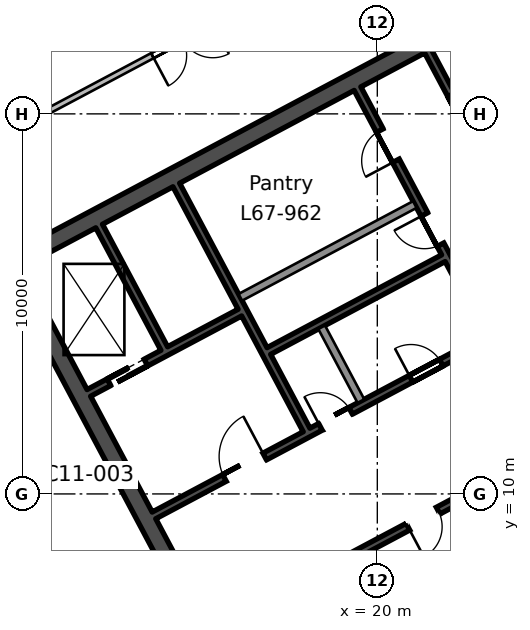
"""IFC4 building model, lengths in metres.
Left out: names, types, materials, properties, quantities, classifications, styles, units other than length and angle.
Written with IfcOpenShell. Run it as: python <this file> out.ifc"""

import sys

from ifc_helpers import new_model, si_unit, direction, frame, frame_2d, origin, place, context, subcontext, project, spatial, rectangle, extrude, element, fill, save


model = new_model("IFC4")
c1 = context("Model", 3, precision=1e-05, world=origin(), true_north=direction((0.0, 1.0)))
c2 = subcontext(c1, "Body", "Model", "MODEL_VIEW")
j1 = project(units=[si_unit("LENGTHUNIT", "METRE"), si_unit("PLANEANGLEUNIT", "RADIAN")], contexts=[c1])
p1 = place(None, origin())
s1 = spatial("IfcSite", under=j1, at=p1, CompositionType="ELEMENT")
p2 = place(p1, origin())
s2 = spatial("IfcBuilding", under=s1, at=p2, CompositionType="ELEMENT")
p3 = place(p2, frame((0.0, 0.0, 297.0)))
s3 = spatial("IfcBuildingStorey", under=s2, at=p3, CompositionType="ELEMENT", Elevation=297.0)
p4 = place(p3, frame((19.207, -0.604, 0.0), z_axis=(0.0, 0.0, 1.0), x_axis=(-0.469467968382, 0.882949504028, 0.0)))
e1 = element("IfcWall", 1, at=p4, inside=s3, PredefinedType="SHEAR", context=c2, shape_type="SweptSolid", body=[
    extrude(rectangle(XDim=19.1, YDim=0.45, at=frame_2d((9.55, 0.0))), origin(), (0.0, 0.0, 1.0), 3.9),
])
p5 = place(p4, frame((6.55, 0.0, 0.0)))
e2 = element("IfcOpeningElement", 2, at=p5, cuts=e1, PredefinedType="OPENING", context=c2, shape_type="SweptSolid", body=[
    extrude(rectangle(XDim=2.4, YDim=2.4, at=frame_2d((1.2, 1.2))), frame((0.0, 0.235, 0.0), z_axis=(0.0, -1.0, 0.0), x_axis=(1.0, 0.0, 0.0)), (0.0, 0.0, 1.0), 0.47),
])
p6 = place(p3, frame((19.3, -0.299, 0.0), z_axis=(0.0, 0.0, 1.0), x_axis=(0.88295276571, 0.46946183394, 0.0)))
e3 = element("IfcWall", 3, at=p6, inside=s3, PredefinedType="SHEAR", context=c2, shape_type="SweptSolid", body=[
    extrude(rectangle(XDim=20.2, YDim=0.45, at=frame_2d((10.1, 0.0))), origin(), (0.0, 0.0, 1.0), 3.9),
])
p7 = place(p3, frame((10.544, 16.167, 0.0), z_axis=(0.0, 0.0, 1.0), x_axis=(0.882947755831, 0.46947125628, 0.0)))
e4 = element("IfcWall", 4, at=p7, inside=s3, PredefinedType="SHEAR", context=c2, shape_type="SweptSolid", body=[
    extrude(rectangle(XDim=20.2, YDim=0.45, at=frame_2d((10.1, 0.0))), origin(), (0.0, 0.0, 1.0), 3.9),
])
p8 = place(p3, frame((14.394, 13.826, 0.0), z_axis=(0.0, 0.0, 1.0), x_axis=(-0.469494272526, 0.882935517501, 0.0)))
e5 = element("IfcWall", 5, at=p8, inside=s3, PredefinedType="SHEAR", context=c2, shape_type="SweptSolid", body=[
    extrude(rectangle(XDim=3.65, YDim=0.2, at=frame_2d((1.825, 0.0))), origin(), (0.0, 0.0, 1.0), 3.9),
])
p9 = place(p3, frame((18.138, 11.683, 0.0), z_axis=(0.0, 0.0, 1.0), x_axis=(-0.469480409012, 0.88294288918, 0.0)))
e6 = element("IfcWall", 6, at=p9, inside=s3, PredefinedType="SHEAR", context=c2, shape_type="SweptSolid", body=[
    extrude(rectangle(XDim=7.3, YDim=0.2, at=frame_2d((3.65, 0.0))), origin(), (0.0, 0.0, 1.0), 3.9),
])
p10 = place(p3, frame((19.569, 12.444, 0.0), z_axis=(0.0, 0.0, 1.0), x_axis=(-0.4694473164, 0.882960484464, 0.0)))
e7 = element("IfcWall", 7, at=p10, inside=s3, PredefinedType="SOLIDWALL", context=c2, shape_type="SweptSolid", body=[
    extrude(rectangle(XDim=2.2, YDim=0.2, at=frame_2d((1.1, 0.0))), origin(), (0.0, 0.0, 1.0), 3.9),
])
p11 = place(p3, frame((22.906, 14.218, 0.0), z_axis=(0.0, 0.0, 1.0), x_axis=(-0.469480409012, 0.88294288918, 0.0)))
e8 = element("IfcWall", 8, at=p11, inside=s3, PredefinedType="SHEAR", context=c2, shape_type="SweptSolid", body=[
    extrude(rectangle(XDim=7.3, YDim=0.2, at=frame_2d((3.65, 0.0))), origin(), (0.0, 0.0, 1.0), 3.9),
])
p12 = place(p11, frame((2.65, 0.0, 0.0)))
e9 = element("IfcOpeningElement", 9, at=p12, cuts=e8, PredefinedType="OPENING", context=c2, shape_type="SweptSolid", body=[
    extrude(rectangle(XDim=0.9, YDim=2.1, at=frame_2d((0.45, 1.05))), frame((0.0, 0.11, 0.0), z_axis=(0.0, -1.0, 0.0), x_axis=(1.0, 0.0, 0.0)), (0.0, 0.0, 1.0), 0.22),
])
p13 = place(p11, frame((5.15, 0.0, 0.0)))
e10 = element("IfcOpeningElement", 10, at=p13, cuts=e8, PredefinedType="OPENING", context=c2, shape_type="SweptSolid", body=[
    extrude(rectangle(XDim=0.9, YDim=2.1, at=frame_2d((0.45, 1.05))), frame((0.0, 0.11, 0.0), z_axis=(0.0, -1.0, 0.0), x_axis=(1.0, 0.0, 0.0)), (0.0, 0.0, 1.0), 0.22),
])
p14 = place(p3, frame((24.76, 15.204, 0.0), z_axis=(0.0, 0.0, 1.0), x_axis=(-0.469494272526, 0.882935517501, 0.0)))
e11 = element("IfcWall", 11, at=p14, inside=s3, PredefinedType="SHEAR", context=c2, shape_type="SweptSolid", body=[
    extrude(rectangle(XDim=7.3, YDim=0.2, at=frame_2d((3.65, 0.0))), origin(), (0.0, 0.0, 1.0), 3.9),
])
p15 = place(p14, frame((4.8, 0.0, 0.0)))
e12 = element("IfcOpeningElement", 12, at=p15, cuts=e11, PredefinedType="OPENING", context=c2, shape_type="SweptSolid", body=[
    extrude(rectangle(XDim=1.2, YDim=2.1, at=frame_2d((0.6, 1.05))), frame((0.0, 0.11, 0.0), z_axis=(0.0, -1.0, 0.0), x_axis=(1.0, 0.0, 0.0)), (0.0, 0.0, 1.0), 0.22),
])
p16 = place(p3, frame((18.104, 7.701, 0.0), z_axis=(0.0, 0.0, 1.0), x_axis=(0.882952937579, 0.469461510692, 0.0)))
e13 = element("IfcWall", 13, at=p16, inside=s3, PredefinedType="SHEAR", context=c2, shape_type="SweptSolid", body=[
    extrude(rectangle(XDim=5.4, YDim=0.2, at=frame_2d((2.7, 0.0))), origin(), (0.0, 0.0, 1.0), 3.9),
])
p17 = place(p16, frame((0.36, 0.0, 0.0)))
e14 = element("IfcOpeningElement", 14, at=p17, cuts=e13, PredefinedType="OPENING", context=c2, shape_type="SweptSolid", body=[
    extrude(rectangle(XDim=0.9, YDim=2.1, at=frame_2d((0.45, 1.05))), frame((0.0, 0.11, 0.0), z_axis=(0.0, -1.0, 0.0), x_axis=(1.0, 0.0, 0.0)), (0.0, 0.0, 1.0), 0.22),
])
p18 = place(p16, frame((3.06, 0.0, 0.0)))
e15 = element("IfcOpeningElement", 15, at=p18, cuts=e13, PredefinedType="OPENING", context=c2, shape_type="SweptSolid", body=[
    extrude(rectangle(XDim=0.9, YDim=2.1, at=frame_2d((0.45, 1.05))), frame((0.0, 0.11, 0.0), z_axis=(0.0, -1.0, 0.0), x_axis=(1.0, 0.0, 0.0)), (0.0, 0.0, 1.0), 0.22),
])
p19 = place(p3, frame((14.124, 9.435, 0.0), z_axis=(0.0, 0.0, 1.0), x_axis=(0.882940221191, 0.469485426614, 0.0)))
e16 = element("IfcWall", 16, at=p19, inside=s3, PredefinedType="SHEAR", context=c2, shape_type="SweptSolid", body=[
    extrude(rectangle(XDim=10.0, YDim=0.2, at=frame_2d((5.0, 0.0))), origin(), (0.0, 0.0, 1.0), 3.9),
])
p20 = place(p19, frame((2.1, 0.0, 0.0)))
e17 = element("IfcOpeningElement", 17, at=p20, cuts=e16, PredefinedType="OPENING", context=c2, shape_type="SweptSolid", body=[
    extrude(rectangle(XDim=1.2, YDim=2.1, at=frame_2d((0.6, 1.05))), frame((0.0, 0.11, 0.0), z_axis=(0.0, -1.0, 0.0), x_axis=(1.0, 0.0, 0.0)), (0.0, 0.0, 1.0), 0.22),
])
p21 = place(p19, frame((4.96, 0.0, 0.0)))
e18 = element("IfcOpeningElement", 18, at=p21, cuts=e16, PredefinedType="OPENING", context=c2, shape_type="SweptSolid", body=[
    extrude(rectangle(XDim=0.9, YDim=2.1, at=frame_2d((0.45, 1.05))), frame((0.0, 0.11, 0.0), z_axis=(0.0, -1.0, 0.0), x_axis=(1.0, 0.0, 0.0)), (0.0, 0.0, 1.0), 0.22),
])
p22 = place(p19, frame((7.66, 0.0, 0.0)))
e19 = element("IfcOpeningElement", 19, at=p22, cuts=e16, PredefinedType="OPENING", context=c2, shape_type="SweptSolid", body=[
    extrude(rectangle(XDim=0.9, YDim=2.1, at=frame_2d((0.45, 1.05))), frame((0.0, 0.11, 0.0), z_axis=(0.0, -1.0, 0.0), x_axis=(1.0, 0.0, 0.0)), (0.0, 0.0, 1.0), 0.22),
])
p23 = place(p3, frame((17.147, 13.761, 0.0), z_axis=(0.0, 0.0, 1.0), x_axis=(0.882964314875, 0.469440111896, 0.0)))
e20 = element("IfcWall", 20, at=p23, inside=s3, PredefinedType="SHEAR", context=c2, shape_type="SweptSolid", body=[
    extrude(rectangle(XDim=5.2, YDim=0.2, at=frame_2d((2.6, 0.0))), origin(), (0.0, 0.0, 1.0), 3.9),
])
p24 = place(p3, frame((12.41, 12.658, 0.0), z_axis=(0.0, 0.0, 1.0), x_axis=(0.8829484765, 0.469469900894, 0.0)))
e21 = element("IfcWall", 21, at=p24, inside=s3, PredefinedType="SHEAR", context=c2, shape_type="SweptSolid", body=[
    extrude(rectangle(XDim=4.5, YDim=0.2, at=frame_2d((2.25, 0.0))), origin(), (0.0, 0.0, 1.0), 3.9),
])
p25 = place(p24, frame((0.6, 0.0, 0.0)))
e22 = element("IfcOpeningElement", 22, at=p25, cuts=e21, PredefinedType="OPENING", context=c2, shape_type="SweptSolid", body=[
    extrude(rectangle(XDim=1.1, YDim=2.1, at=frame_2d((0.55, 1.05))), frame((0.0, 0.11, 0.0), z_axis=(0.0, -1.0, 0.0), x_axis=(1.0, 0.0, 0.0)), (0.0, 0.0, 1.0), 0.22),
])
p26 = place(p3, frame((16.396, 15.173, 0.0), z_axis=(0.0, 0.0, 1.0), x_axis=(0.882934506056, 0.469496174655, 0.0)))
e23 = element("IfcWall", 23, at=p26, inside=s3, PredefinedType="SOLIDWALL", context=c2, shape_type="SweptSolid", body=[
    extrude(rectangle(XDim=5.2, YDim=0.2, at=frame_2d((2.6, 0.0))), origin(), (0.0, 0.0, 1.0), 3.9),
])
p27 = place(p3, frame((0.0, 14.044, 0.0), z_axis=(0.0, 0.0, 1.0), x_axis=(0.882952097871, 0.469463089992, 0.0)))
e24 = element("IfcWall", 24, at=p27, inside=s3, PredefinedType="PARTITIONING", context=c2, shape_type="SweptSolid", body=[
    extrude(rectangle(XDim=33.607, YDim=0.15, at=frame_2d((16.803, 0.0))), origin(), (0.0, 0.0, 1.0), 3.54),
])
p28 = place(p27, frame((15.95, 0.0, 0.0)))
e25 = element("IfcOpeningElement", 25, at=p28, cuts=e24, PredefinedType="OPENING", context=c2, shape_type="SweptSolid", body=[
    extrude(rectangle(XDim=1.8, YDim=2.1, at=frame_2d((0.9, 1.05))), frame((0.0, 0.085, 0.0), z_axis=(0.0, -1.0, 0.0), x_axis=(1.0, 0.0, 0.0)), (0.0, 0.0, 1.0), 0.17),
])
p29 = place(p3, frame((1.405, 21.133, 0.0), z_axis=(0.0, 0.0, 1.0), x_axis=(0.882934197132, 0.469496755618, 0.0)))
e26 = element("IfcWall", 26, at=p29, inside=s3, PredefinedType="PARTITIONING", context=c2, shape_type="SweptSolid", body=[
    extrude(rectangle(XDim=15.504, YDim=0.15, at=frame_2d((7.752, 0.0))), origin(), (0.0, 0.0, 1.0), 3.54),
])
p30 = place(p20, origin())
e27 = element("IfcDoor", 27, at=p30, inside=s3, OperationType="SINGLE_SWING_RIGHT", PredefinedType="DOOR", context=c2, shape_type="SweptSolid", body=[
    extrude(rectangle(XDim=1.2, YDim=2.1, at=frame_2d((0.6, 1.05))), frame((0.0, 0.025, 0.0), z_axis=(0.0, -1.0, 0.0), x_axis=(1.0, 0.0, 0.0)), (0.0, 0.0, 1.0), 0.05),
])
fill(e17, e27)
p31 = place(p15, frame((1.2, 0.0, 0.0), z_axis=(0.0, 0.0, 1.0), x_axis=(-1.0, 0.0, 0.0)))
e28 = element("IfcDoor", 28, at=p31, inside=s3, OperationType="SINGLE_SWING_RIGHT", PredefinedType="DOOR", context=c2, shape_type="SweptSolid", body=[
    extrude(rectangle(XDim=1.2, YDim=2.1, at=frame_2d((0.6, 1.05))), frame((0.0, 0.025, 0.0), z_axis=(0.0, -1.0, 0.0), x_axis=(1.0, 0.0, 0.0)), (0.0, 0.0, 1.0), 0.05),
])
fill(e12, e28)
p32 = place(p21, origin())
e29 = element("IfcDoor", 29, at=p32, inside=s3, OperationType="SINGLE_SWING_LEFT", PredefinedType="DOOR", context=c2, shape_type="SweptSolid", body=[
    extrude(rectangle(XDim=0.9, YDim=2.1, at=frame_2d((0.45, 1.05))), frame((0.0, 0.025, 0.0), z_axis=(0.0, -1.0, 0.0), x_axis=(1.0, 0.0, 0.0)), (0.0, 0.0, 1.0), 0.05),
])
fill(e18, e29)
p33 = place(p22, origin())
e30 = element("IfcDoor", 30, at=p33, inside=s3, OperationType="SINGLE_SWING_LEFT", PredefinedType="DOOR", context=c2, shape_type="SweptSolid", body=[
    extrude(rectangle(XDim=0.9, YDim=2.1, at=frame_2d((0.45, 1.05))), frame((0.0, 0.025, 0.0), z_axis=(0.0, -1.0, 0.0), x_axis=(1.0, 0.0, 0.0)), (0.0, 0.0, 1.0), 0.05),
])
fill(e19, e30)
p34 = place(p18, frame((0.9, 0.0, 0.0), z_axis=(0.0, 0.0, 1.0), x_axis=(-1.0, 0.0, 0.0)))
e31 = element("IfcDoor", 31, at=p34, inside=s3, OperationType="SINGLE_SWING_RIGHT", PredefinedType="DOOR", context=c2, shape_type="SweptSolid", body=[
    extrude(rectangle(XDim=0.9, YDim=2.1, at=frame_2d((0.45, 1.05))), frame((0.0, 0.025, 0.0), z_axis=(0.0, -1.0, 0.0), x_axis=(1.0, 0.0, 0.0)), (0.0, 0.0, 1.0), 0.05),
])
fill(e15, e31)
p35 = place(p25, origin())
e32 = element("IfcDoor", 32, at=p35, inside=s3, OperationType="DOUBLE_DOOR_SLIDING", PredefinedType="DOOR", context=c2, shape_type="SweptSolid", body=[
    extrude(rectangle(XDim=1.1, YDim=2.1, at=frame_2d((0.55, 1.05))), frame((0.0, 0.025, 0.0), z_axis=(0.0, -1.0, 0.0), x_axis=(1.0, 0.0, 0.0)), (0.0, 0.0, 1.0), 0.05),
])
fill(e22, e32)
p36 = place(p12, origin())
e33 = element("IfcDoor", 33, at=p36, inside=s3, OperationType="SINGLE_SWING_RIGHT", PredefinedType="DOOR", context=c2, shape_type="SweptSolid", body=[
    extrude(rectangle(XDim=0.9, YDim=2.1, at=frame_2d((0.45, 1.05))), frame((0.0, 0.025, 0.0), z_axis=(0.0, -1.0, 0.0), x_axis=(1.0, 0.0, 0.0)), (0.0, 0.0, 1.0), 0.05),
])
fill(e9, e33)
p37 = place(p13, origin())
e34 = element("IfcDoor", 34, at=p37, inside=s3, OperationType="SINGLE_SWING_LEFT", PredefinedType="DOOR", context=c2, shape_type="SweptSolid", body=[
    extrude(rectangle(XDim=0.9, YDim=2.1, at=frame_2d((0.45, 1.05))), frame((0.0, 0.025, 0.0), z_axis=(0.0, -1.0, 0.0), x_axis=(1.0, 0.0, 0.0)), (0.0, 0.0, 1.0), 0.05),
])
fill(e10, e34)
p38 = place(p28, frame((1.8, 0.0, 0.0), z_axis=(0.0, 0.0, 1.0), x_axis=(-1.0, 0.0, 0.0)))
e35 = element("IfcDoor", 35, at=p38, inside=s3, OperationType="DOUBLE_DOOR_SINGLE_SWING", PredefinedType="DOOR", context=c2, shape_type="SweptSolid", body=[
    extrude(rectangle(XDim=1.8, YDim=2.1, at=frame_2d((0.9, 1.05))), frame((0.0, 0.025, 0.0), z_axis=(0.0, -1.0, 0.0), x_axis=(1.0, 0.0, 0.0)), (0.0, 0.0, 1.0), 0.05),
])
fill(e25, e35)
save(model, sys.argv[1])
